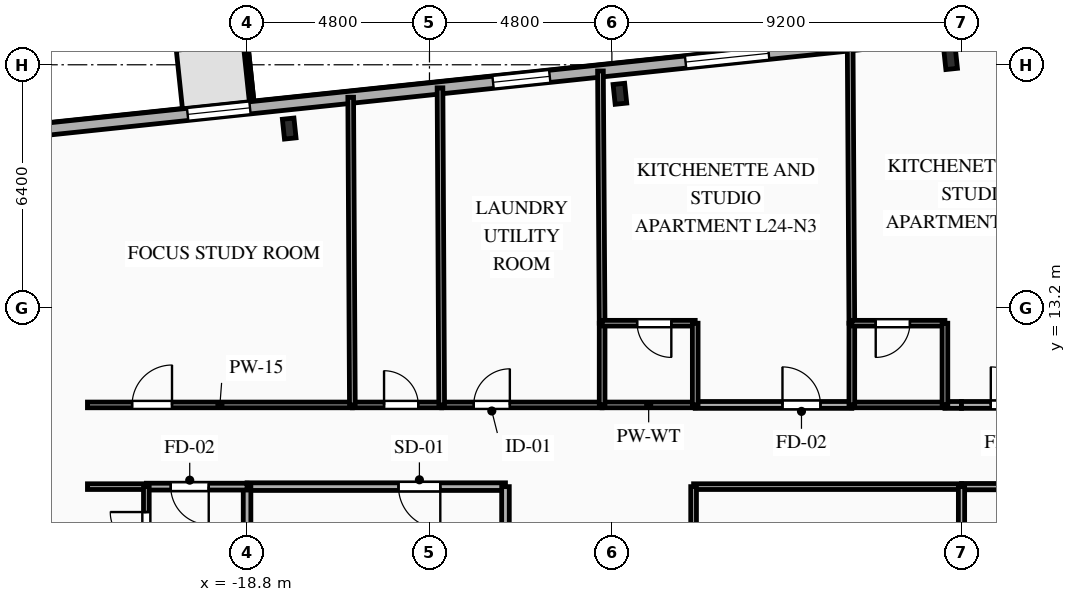
"""IFC4 building model, lengths in metres.
Left out: names, types, materials, properties, quantities, classifications, styles, units other than length and angle.
Written with IfcOpenShell. Run it as: python <this file> out.ifc"""

import sys

from ifc_helpers import new_model, si_unit, direction, frame, frame_2d, origin, origin_2d, place, context, subcontext, project, spatial, rectangle, i_section, extrude, element, fill, save


model = new_model("IFC4")
c1 = context("Model", 3, precision=1e-05, world=origin(), true_north=direction((0.0, 1.0)))
c2 = subcontext(c1, "Body", "Model", "MODEL_VIEW")
j1 = project(units=[si_unit("LENGTHUNIT", "METRE"), si_unit("PLANEANGLEUNIT", "RADIAN")], contexts=[c1])
p1 = place(None, origin())
s1 = spatial("IfcSite", under=j1, at=p1, CompositionType="ELEMENT")
p2 = place(p1, origin())
s2 = spatial("IfcBuilding", under=s1, at=p2, CompositionType="ELEMENT")
p3 = place(p2, frame((0.0, 0.0, 89.05)))
s3 = spatial("IfcBuildingStorey", under=s2, at=p3, CompositionType="ELEMENT", Elevation=89.05)
for number, where, z_axis, x_axis in (
    (1, (-0.287, 19.751, 0.0), (0.0, 0.0, 1.0), (0.995, 0.105, 0.0)),
    (2, (-8.989, 18.836, 0.0), (0.0, 0.0, 1.0), (0.995, 0.105, 0.0)),
    (3, (-17.691, 17.922, 0.0), (0.0, 0.0, 1.0), (0.995, 0.105, 0.0)),
):
    element("IfcColumn", number, at=place(p3, frame(where, z_axis=z_axis, x_axis=x_axis)), inside=s3, PredefinedType="COLUMN", context=c2, shape_type="SweptSolid", body=[
        extrude(i_section(OverallWidth=0.306, OverallDepth=0.524, WebThickness=0.021, FlangeThickness=0.04, FilletRadius=0.027, at=origin_2d()), origin(), (0.0, 0.0, 1.0), 3.35),
    ])
p4 = place(p3, frame((-27.107, 17.586, 0.0), z_axis=(0.0, 0.0, 1.0), x_axis=(0.994521628355, 0.104531003701, 0.0)))
e4 = element("IfcWall", 4, at=p4, inside=s3, PredefinedType="SOLIDWALL", context=c2, shape_type="SweptSolid", body=[
    extrude(rectangle(XDim=53.8, YDim=0.32, at=frame_2d((26.9, 0.0))), origin(), (0.0, 0.0, 1.0), 3.045),
])
p5 = place(p4, frame((6.781, 0.0, 0.85)))
e5 = element("IfcOpeningElement", 5, at=p5, cuts=e4, PredefinedType="OPENING", context=c2, shape_type="SweptSolid", body=[
    extrude(rectangle(XDim=1.65, YDim=1.85, at=frame_2d((0.825, 0.925))), frame((0.0, 0.17, 0.0), z_axis=(0.0, -1.0, 0.0), x_axis=(1.0, 0.0, 0.0)), (0.0, 0.0, 1.0), 0.34),
])
p6 = place(p4, frame((14.862, 0.0, 0.85)))
e6 = element("IfcOpeningElement", 6, at=p6, cuts=e4, PredefinedType="OPENING", context=c2, shape_type="SweptSolid", body=[
    extrude(rectangle(XDim=1.5, YDim=1.85, at=frame_2d((0.75, 0.925))), frame((0.0, 0.17, 0.0), z_axis=(0.0, -1.0, 0.0), x_axis=(1.0, 0.0, 0.0)), (0.0, 0.0, 1.0), 0.34),
])
p7 = place(p4, frame((19.956, 0.0, 0.85)))
e7 = element("IfcOpeningElement", 7, at=p7, cuts=e4, PredefinedType="OPENING", context=c2, shape_type="SweptSolid", body=[
    extrude(rectangle(XDim=2.2, YDim=1.85, at=frame_2d((1.1, 0.925))), frame((0.0, 0.17, 0.0), z_axis=(0.0, -1.0, 0.0), x_axis=(1.0, 0.0, 0.0)), (0.0, 0.0, 1.0), 0.34),
])
p8 = place(p4, frame((26.561, 0.0, 0.85)))
e8 = element("IfcOpeningElement", 8, at=p8, cuts=e4, PredefinedType="OPENING", context=c2, shape_type="SweptSolid", body=[
    extrude(rectangle(XDim=2.2, YDim=1.85, at=frame_2d((1.1, 0.925))), frame((0.0, 0.17, 0.0), z_axis=(0.0, -1.0, 0.0), x_axis=(1.0, 0.0, 0.0)), (0.0, 0.0, 1.0), 0.34),
])
p9 = place(p4, frame((33.166, 0.0, 0.85)))
e9 = element("IfcOpeningElement", 9, at=p9, cuts=e4, PredefinedType="OPENING", context=c2, shape_type="SweptSolid", body=[
    extrude(rectangle(XDim=2.2, YDim=1.85, at=frame_2d((1.1, 0.925))), frame((0.0, 0.17, 0.0), z_axis=(0.0, -1.0, 0.0), x_axis=(1.0, 0.0, 0.0)), (0.0, 0.0, 1.0), 0.34),
])
p10 = place(p4, frame((39.771, 0.0, 0.85)))
e10 = element("IfcOpeningElement", 10, at=p10, cuts=e4, PredefinedType="OPENING", context=c2, shape_type="SweptSolid", body=[
    extrude(rectangle(XDim=2.2, YDim=1.85, at=frame_2d((1.1, 0.925))), frame((0.0, 0.17, 0.0), z_axis=(0.0, -1.0, 0.0), x_axis=(1.0, 0.0, 0.0)), (0.0, 0.0, 1.0), 0.34),
])
p11 = place(p4, frame((46.45, 0.0, 0.85)))
e11 = element("IfcOpeningElement", 11, at=p11, cuts=e4, PredefinedType="OPENING", context=c2, shape_type="SweptSolid", body=[
    extrude(rectangle(XDim=1.65, YDim=1.85, at=frame_2d((0.825, 0.925))), frame((0.0, 0.17, 0.0), z_axis=(0.0, -1.0, 0.0), x_axis=(1.0, 0.0, 0.0)), (0.0, 0.0, 1.0), 0.34),
])
p12 = place(p3, frame((-12.0, 8.5, 0.0), z_axis=(0.0, 0.0, 1.0), x_axis=(-1.0, 0.0, 0.0)))
e12 = element("IfcWall", 12, at=p12, inside=s3, PredefinedType="PARTITIONING", context=c2, shape_type="SweptSolid", body=[
    extrude(rectangle(XDim=6.8, YDim=0.2, at=frame_2d((3.4, 0.0))), origin(), (0.0, 0.0, 1.0), 3.045),
])
p13 = place(p12, frame((1.715, 0.0, 0.0)))
e13 = element("IfcOpeningElement", 13, at=p13, cuts=e12, PredefinedType="OPENING", context=c2, shape_type="SweptSolid", body=[
    extrude(rectangle(XDim=1.1, YDim=2.15, at=frame_2d((0.55, 1.075))), frame((0.0, 0.11, 0.0), z_axis=(0.0, -1.0, 0.0), x_axis=(1.0, 0.0, 0.0)), (0.0, 0.0, 1.0), 0.22),
])
p14 = place(p3, frame((-12.0, 5.6, 0.0), z_axis=(0.0, 0.0, 1.0), x_axis=(0.0, 1.0, 0.0)))
e14 = element("IfcWall", 14, at=p14, inside=s3, PredefinedType="PARTITIONING", context=c2, shape_type="SweptSolid", body=[
    extrude(rectangle(XDim=2.9, YDim=0.2, at=frame_2d((1.45, 0.0))), origin(), (0.0, 0.0, 1.0), 3.045),
])
p15 = place(p3, frame((-18.8, 8.5, 0.0), z_axis=(0.0, 0.0, 1.0), x_axis=(0.0, -1.0, 0.0)))
e15 = element("IfcWall", 15, at=p15, inside=s3, PredefinedType="PARTITIONING", context=c2, shape_type="SweptSolid", body=[
    extrude(rectangle(XDim=2.9, YDim=0.2, at=frame_2d((1.45, 0.0))), origin(), (0.0, 0.0, 1.0), 2.53),
])
p16 = place(p3, frame((-18.8, 8.5, 0.0), z_axis=(0.0, 0.0, 1.0), x_axis=(-1.0, 0.0, 0.0)))
e16 = element("IfcWall", 16, at=p16, inside=s3, PredefinedType="PARTITIONING", context=c2, shape_type="SweptSolid", body=[
    extrude(rectangle(XDim=2.65, YDim=0.18, at=frame_2d((1.325, 0.0))), origin(), (0.0, 0.0, 1.0), 3.045),
])
p17 = place(p16, frame((1.009, 0.0, 0.0)))
e17 = element("IfcOpeningElement", 17, at=p17, cuts=e16, PredefinedType="OPENING", context=c2, shape_type="SweptSolid", body=[
    extrude(rectangle(XDim=1.0, YDim=2.15, at=frame_2d((0.5, 1.075))), frame((0.0, 0.1, 0.0), z_axis=(0.0, -1.0, 0.0), x_axis=(1.0, 0.0, 0.0)), (0.0, 0.0, 1.0), 0.2),
])
p18 = place(p3, frame((-21.45, 8.5, 0.0), z_axis=(0.0, 0.0, 1.0), x_axis=(-1.0, 0.0, 0.0)))
e18 = element("IfcWall", 18, at=p18, inside=s3, PredefinedType="PARTITIONING", context=c2, shape_type="SweptSolid", body=[
    extrude(rectangle(XDim=1.55, YDim=0.15, at=frame_2d((0.775, 0.0))), origin(), (0.0, 0.0, 1.0), 3.045),
])
p19 = place(p3, frame((-23.0, 10.65, 0.0), z_axis=(0.0, 0.0, 1.0), x_axis=(1.0, 0.0, 0.0)))
e19 = element("IfcWall", 19, at=p19, inside=s3, PredefinedType="PARTITIONING", context=c2, shape_type="SweptSolid", body=[
    extrude(rectangle(XDim=6.971, YDim=0.15, at=frame_2d((3.485, 0.0))), origin(), (0.0, 0.0, 1.0), 3.045),
])
p20 = place(p19, frame((1.175, 0.0, 0.0)))
e20 = element("IfcOpeningElement", 20, at=p20, cuts=e19, PredefinedType="OPENING", context=c2, shape_type="SweptSolid", body=[
    extrude(rectangle(XDim=1.05, YDim=2.15, at=frame_2d((0.525, 1.075))), frame((0.0, 0.085, 0.0), z_axis=(0.0, -1.0, 0.0), x_axis=(1.0, 0.0, 0.0)), (0.0, 0.0, 1.0), 0.17),
])
p21 = place(p3, frame((-16.029, 10.65, 0.0), z_axis=(0.0, 0.0, 1.0), x_axis=(1.0, 0.0, 0.0)))
e21 = element("IfcWall", 21, at=p21, inside=s3, PredefinedType="PLUMBINGWALL", context=c2, shape_type="SweptSolid", body=[
    extrude(rectangle(XDim=2.35, YDim=0.15, at=frame_2d((1.175, 0.0))), origin(), (0.0, 0.0, 1.0), 3.045),
])
p22 = place(p21, frame((0.834, 0.0, 0.0)))
e22 = element("IfcOpeningElement", 22, at=p22, cuts=e21, PredefinedType="OPENING", context=c2, shape_type="SweptSolid", body=[
    extrude(rectangle(XDim=0.9, YDim=2.1, at=frame_2d((0.45, 1.05))), frame((0.0, 0.085, 0.0), z_axis=(0.0, -1.0, 0.0), x_axis=(1.0, 0.0, 0.0)), (0.0, 0.0, 1.0), 0.17),
])
p23 = place(p3, frame((-13.679, 10.65, 0.0), z_axis=(0.0, 0.0, 1.0), x_axis=(1.0, 0.0, 0.0)))
e23 = element("IfcWall", 23, at=p23, inside=s3, PredefinedType="PARTITIONING", context=c2, shape_type="SweptSolid", body=[
    extrude(rectangle(XDim=4.222, YDim=0.15, at=frame_2d((2.111, 0.0))), origin(), (0.0, 0.0, 1.0), 3.045),
])
p24 = place(p23, frame((0.844, 0.0, 0.0)))
e24 = element("IfcOpeningElement", 24, at=p24, cuts=e23, PredefinedType="OPENING", context=c2, shape_type="SweptSolid", body=[
    extrude(rectangle(XDim=0.95, YDim=2.1, at=frame_2d((0.475, 1.05))), frame((0.0, 0.085, 0.0), z_axis=(0.0, -1.0, 0.0), x_axis=(1.0, 0.0, 0.0)), (0.0, 0.0, 1.0), 0.17),
])
p25 = place(p3, frame((-7.007, 10.65, 0.0), z_axis=(0.0, 0.0, 1.0), x_axis=(1.0, 0.0, 0.0)))
e25 = element("IfcWall", 25, at=p25, inside=s3, PredefinedType="PARTITIONING", context=c2, shape_type="SweptSolid", body=[
    extrude(rectangle(XDim=4.121, YDim=0.18, at=frame_2d((2.061, 0.0))), origin(), (0.0, 0.0, 1.0), 3.045),
])
p26 = place(p25, frame((2.296, 0.0, 0.0)))
e26 = element("IfcOpeningElement", 26, at=p26, cuts=e25, PredefinedType="OPENING", context=c2, shape_type="SweptSolid", body=[
    extrude(rectangle(XDim=1.0, YDim=2.15, at=frame_2d((0.5, 1.075))), frame((0.0, 0.1, 0.0), z_axis=(0.0, -1.0, 0.0), x_axis=(1.0, 0.0, 0.0)), (0.0, 0.0, 1.0), 0.2),
])
p27 = place(p3, frame((-9.457, 10.65, 0.0), z_axis=(0.0, 0.0, 1.0), x_axis=(1.0, 0.0, 0.0)))
e27 = element("IfcWall", 27, at=p27, inside=s3, PredefinedType="PLUMBINGWALL", context=c2, shape_type="SweptSolid", body=[
    extrude(rectangle(XDim=2.45, YDim=0.15, at=frame_2d((1.225, 0.0))), origin(), (0.0, 0.0, 1.0), 3.045),
])
p28 = place(p3, frame((-0.436, 10.65, 0.0), z_axis=(0.0, 0.0, 1.0), x_axis=(1.0, 0.0, 0.0)))
e28 = element("IfcWall", 28, at=p28, inside=s3, PredefinedType="PARTITIONING", context=c2, shape_type="SweptSolid", body=[
    extrude(rectangle(XDim=0.436, YDim=0.18, at=frame_2d((0.218, 0.0))), origin(), (0.0, 0.0, 1.0), 3.045),
])
p29 = place(p3, frame((-2.886, 10.65, 0.0), z_axis=(0.0, 0.0, 1.0), x_axis=(1.0, 0.0, 0.0)))
e29 = element("IfcWall", 29, at=p29, inside=s3, PredefinedType="PLUMBINGWALL", context=c2, shape_type="SweptSolid", body=[
    extrude(rectangle(XDim=2.45, YDim=0.15, at=frame_2d((1.225, 0.0))), origin(), (0.0, 0.0, 1.0), 3.045),
])
p30 = place(p3, frame((0.0, 8.5, 0.0), z_axis=(0.0, 0.0, 1.0), x_axis=(-1.0, 0.0, 0.0)))
e30 = element("IfcWall", 30, at=p30, inside=s3, PredefinedType="PARTITIONING", context=c2, shape_type="SweptSolid", body=[
    extrude(rectangle(XDim=7.05, YDim=0.15, at=frame_2d((3.525, 0.0))), origin(), (0.0, 0.0, 1.0), 3.045),
])
p31 = place(p3, frame((0.0, 10.65, 0.0), z_axis=(0.0, 0.0, 1.0), x_axis=(1.0, 0.0, 0.0)))
e31 = element("IfcWall", 31, at=p31, inside=s3, PredefinedType="PARTITIONING", context=c2, shape_type="SweptSolid", body=[
    extrude(rectangle(XDim=3.686, YDim=0.18, at=frame_2d((1.843, 0.0))), origin(), (0.0, 0.0, 1.0), 3.045),
])
p32 = place(p31, frame((0.771, 0.0, 0.0)))
e32 = element("IfcOpeningElement", 32, at=p32, cuts=e31, PredefinedType="OPENING", context=c2, shape_type="SweptSolid", body=[
    extrude(rectangle(XDim=1.0, YDim=2.15, at=frame_2d((0.5, 1.075))), frame((0.0, 0.1, 0.0), z_axis=(0.0, -1.0, 0.0), x_axis=(1.0, 0.0, 0.0)), (0.0, 0.0, 1.0), 0.2),
])
p33 = place(p3, frame((7.05, 8.5, 0.0), z_axis=(0.0, 0.0, 1.0), x_axis=(-1.0, 0.0, 0.0)))
e33 = element("IfcWall", 33, at=p33, inside=s3, PredefinedType="PARTITIONING", context=c2, shape_type="SweptSolid", body=[
    extrude(rectangle(XDim=7.05, YDim=0.165, at=frame_2d((3.525, 0.0))), origin(), (0.0, 0.0, 1.0), 3.045),
])
p34 = place(p33, frame((4.728, 0.0, 0.0)))
e34 = element("IfcOpeningElement", 34, at=p34, cuts=e33, PredefinedType="OPENING", context=c2, shape_type="SweptSolid", body=[
    extrude(rectangle(XDim=1.15, YDim=2.15, at=frame_2d((0.575, 1.075))), frame((0.0, 0.093, 0.0), z_axis=(0.0, -1.0, 0.0), x_axis=(1.0, 0.0, 0.0)), (0.0, 0.0, 1.0), 0.185),
])
p35 = place(p3, frame((-7.05, 8.5, 0.0), z_axis=(0.0, 0.0, 1.0), x_axis=(0.0, -1.0, 0.0)))
e35 = element("IfcWall", 35, at=p35, inside=s3, PredefinedType="PARTITIONING", context=c2, shape_type="SweptSolid", body=[
    extrude(rectangle(XDim=14.1, YDim=0.15, at=frame_2d((7.05, 0.0))), origin(), (0.0, 0.0, 1.0), 3.045),
])
p36 = place(p35, frame((8.011, 0.0, 0.0)))
e36 = element("IfcOpeningElement", 36, at=p36, cuts=e35, PredefinedType="OPENING", context=c2, shape_type="SweptSolid", body=[
    extrude(rectangle(XDim=1.05, YDim=2.15, at=frame_2d((0.525, 1.075))), frame((0.0, 0.085, 0.0), z_axis=(0.0, -1.0, 0.0), x_axis=(1.0, 0.0, 0.0)), (0.0, 0.0, 1.0), 0.17),
])
p37 = place(p3, frame((-21.45, 5.68, 0.0), z_axis=(0.0, 0.0, 1.0), x_axis=(0.0, 1.0, 0.0)))
e37 = element("IfcWall", 37, at=p37, inside=s3, PredefinedType="PARTITIONING", context=c2, shape_type="SweptSolid", body=[
    extrude(rectangle(XDim=2.82, YDim=0.15, at=frame_2d((1.41, 0.0))), origin(), (0.0, 0.0, 1.0), 3.045),
])
p38 = place(p37, frame((1.201, 0.0, 0.0)))
e38 = element("IfcOpeningElement", 38, at=p38, cuts=e37, PredefinedType="OPENING", context=c2, shape_type="SweptSolid", body=[
    extrude(rectangle(XDim=0.95, YDim=2.1, at=frame_2d((0.475, 1.05))), frame((0.0, 0.085, 0.0), z_axis=(0.0, -1.0, 0.0), x_axis=(1.0, 0.0, 0.0)), (0.0, 0.0, 1.0), 0.17),
])
p39 = place(p3, frame((-16.073, 18.746, 0.0), z_axis=(0.0, 0.0, 1.0), x_axis=(0.005428146808, -0.999985267503, 0.0)))
e39 = element("IfcWall", 39, at=p39, inside=s3, PredefinedType="PLUMBINGWALL", context=c2, shape_type="SweptSolid", body=[
    extrude(rectangle(XDim=8.096, YDim=0.15, at=frame_2d((4.048, 0.0))), origin(), (0.0, 0.0, 1.0), 3.045),
])
p40 = place(p3, frame((-13.723, 18.992, 0.0), z_axis=(0.0, 0.0, 1.0), x_axis=(0.005267551513, -0.999986126354, 0.0)))
e40 = element("IfcWall", 40, at=p40, inside=s3, PredefinedType="PLUMBINGWALL", context=c2, shape_type="SweptSolid", body=[
    extrude(rectangle(XDim=8.343, YDim=0.15, at=frame_2d((4.171, 0.0))), origin(), (0.0, 0.0, 1.0), 3.045),
])
p41 = place(p3, frame((-9.501, 19.436, 0.0), z_axis=(0.0, 0.0, 1.0), x_axis=(0.006621884097, -0.999978075085, 0.0)))
e41 = element("IfcWall", 41, at=p41, inside=s3, PredefinedType="PARTITIONING", context=c2, shape_type="SweptSolid", body=[
    extrude(rectangle(XDim=6.636, YDim=0.15, at=frame_2d((3.318, 0.0))), origin(), (0.0, 0.0, 1.0), 3.045),
])
p42 = place(p3, frame((-9.457, 12.8, 0.0), z_axis=(0.0, 0.0, 1.0), x_axis=(0.0, -1.0, 0.0)))
e42 = element("IfcWall", 42, at=p42, inside=s3, PredefinedType="PLUMBINGWALL", context=c2, shape_type="SweptSolid", body=[
    extrude(rectangle(XDim=2.15, YDim=0.15, at=frame_2d((1.075, 0.0))), origin(), (0.0, 0.0, 1.0), 3.045),
])
p43 = place(p3, frame((-7.007, 12.8, 0.0), z_axis=(0.0, 0.0, 1.0), x_axis=(-1.0, 0.0, 0.0)))
e43 = element("IfcWall", 43, at=p43, inside=s3, PredefinedType="PLUMBINGWALL", context=c2, shape_type="SweptSolid", body=[
    extrude(rectangle(XDim=2.45, YDim=0.15, at=frame_2d((1.225, 0.0))), origin(), (0.0, 0.0, 1.0), 3.045),
])
p44 = place(p43, frame((0.629, 0.0, 0.0)))
e44 = element("IfcOpeningElement", 44, at=p44, cuts=e43, PredefinedType="OPENING", context=c2, shape_type="SweptSolid", body=[
    extrude(rectangle(XDim=0.9, YDim=2.1, at=frame_2d((0.45, 1.05))), frame((0.0, 0.085, 0.0), z_axis=(0.0, -1.0, 0.0), x_axis=(1.0, 0.0, 0.0)), (0.0, 0.0, 1.0), 0.17),
])
p45 = place(p3, frame((-7.007, 10.65, 0.0), z_axis=(0.0, 0.0, 1.0), x_axis=(0.0, 1.0, 0.0)))
e45 = element("IfcWall", 45, at=p45, inside=s3, PredefinedType="PLUMBINGWALL", context=c2, shape_type="SweptSolid", body=[
    extrude(rectangle(XDim=2.15, YDim=0.15, at=frame_2d((1.075, 0.0))), origin(), (0.0, 0.0, 1.0), 3.045),
])
p46 = place(p3, frame((-2.93, 20.127, 0.0), z_axis=(0.0, 0.0, 1.0), x_axis=(0.005997692928, -0.999982013678, 0.0)))
e46 = element("IfcWall", 46, at=p46, inside=s3, PredefinedType="PARTITIONING", context=c2, shape_type="SweptSolid", body=[
    extrude(rectangle(XDim=7.327, YDim=0.15, at=frame_2d((3.664, 0.0))), origin(), (0.0, 0.0, 1.0), 3.045),
])
p47 = place(p3, frame((-2.886, 12.8, 0.0), z_axis=(0.0, 0.0, 1.0), x_axis=(0.0, -1.0, 0.0)))
e47 = element("IfcWall", 47, at=p47, inside=s3, PredefinedType="PLUMBINGWALL", context=c2, shape_type="SweptSolid", body=[
    extrude(rectangle(XDim=2.15, YDim=0.15, at=frame_2d((1.075, 0.0))), origin(), (0.0, 0.0, 1.0), 3.045),
])
p48 = place(p3, frame((-0.436, 12.8, 0.0), z_axis=(0.0, 0.0, 1.0), x_axis=(-1.0, 0.0, 0.0)))
e48 = element("IfcWall", 48, at=p48, inside=s3, PredefinedType="PLUMBINGWALL", context=c2, shape_type="SweptSolid", body=[
    extrude(rectangle(XDim=2.45, YDim=0.15, at=frame_2d((1.225, 0.0))), origin(), (0.0, 0.0, 1.0), 3.045),
])
p49 = place(p48, frame((0.921, 0.0, 0.0)))
e49 = element("IfcOpeningElement", 49, at=p49, cuts=e48, PredefinedType="OPENING", context=c2, shape_type="SweptSolid", body=[
    extrude(rectangle(XDim=0.9, YDim=2.1, at=frame_2d((0.45, 1.05))), frame((0.0, 0.085, 0.0), z_axis=(0.0, -1.0, 0.0), x_axis=(1.0, 0.0, 0.0)), (0.0, 0.0, 1.0), 0.17),
])
p50 = place(p3, frame((-0.436, 10.65, 0.0), z_axis=(0.0, 0.0, 1.0), x_axis=(0.0, 1.0, 0.0)))
e50 = element("IfcWall", 50, at=p50, inside=s3, PredefinedType="PLUMBINGWALL", context=c2, shape_type="SweptSolid", body=[
    extrude(rectangle(XDim=2.15, YDim=0.15, at=frame_2d((1.075, 0.0))), origin(), (0.0, 0.0, 1.0), 3.045),
])
p51 = place(p3, frame((0.0, 8.5, 0.0), z_axis=(0.0, 0.0, 1.0), x_axis=(0.0, -1.0, 0.0)))
e51 = element("IfcWall", 51, at=p51, inside=s3, PredefinedType="PARTITIONING", context=c2, shape_type="SweptSolid", body=[
    extrude(rectangle(XDim=7.05, YDim=0.165, at=frame_2d((3.525, 0.0))), origin(), (0.0, 0.0, 1.0), 3.045),
])
p52 = place(p5, origin())
e52 = element("IfcWindow", 52, at=p52, inside=s3, PartitioningType="SINGLE_PANEL", PredefinedType="WINDOW", context=c2, shape_type="SweptSolid", body=[
    extrude(rectangle(XDim=1.65, YDim=1.85, at=frame_2d((0.825, 0.925))), frame((0.0, 0.03, 0.0), z_axis=(0.0, -1.0, 0.0), x_axis=(1.0, 0.0, 0.0)), (0.0, 0.0, 1.0), 0.06),
])
fill(e5, e52)
p53 = place(p6, origin())
e53 = element("IfcWindow", 53, at=p53, inside=s3, PartitioningType="SINGLE_PANEL", PredefinedType="WINDOW", context=c2, shape_type="SweptSolid", body=[
    extrude(rectangle(XDim=1.5, YDim=1.85, at=frame_2d((0.75, 0.925))), frame((0.0, 0.03, 0.0), z_axis=(0.0, -1.0, 0.0), x_axis=(1.0, 0.0, 0.0)), (0.0, 0.0, 1.0), 0.06),
])
fill(e6, e53)
p54 = place(p7, origin())
e54 = element("IfcWindow", 54, at=p54, inside=s3, PartitioningType="SINGLE_PANEL", PredefinedType="WINDOW", context=c2, shape_type="SweptSolid", body=[
    extrude(rectangle(XDim=2.2, YDim=1.85, at=frame_2d((1.1, 0.925))), frame((0.0, 0.03, 0.0), z_axis=(0.0, -1.0, 0.0), x_axis=(1.0, 0.0, 0.0)), (0.0, 0.0, 1.0), 0.06),
])
fill(e7, e54)
p55 = place(p13, origin())
e55 = element("IfcDoor", 55, at=p55, inside=s3, OperationType="SINGLE_SWING_LEFT", PredefinedType="DOOR", context=c2, shape_type="SweptSolid", body=[
    extrude(rectangle(XDim=1.1, YDim=2.15, at=frame_2d((0.55, 1.075))), frame((0.0, 0.025, 0.0), z_axis=(0.0, -1.0, 0.0), x_axis=(1.0, 0.0, 0.0)), (0.0, 0.0, 1.0), 0.05),
])
fill(e13, e55)
p56 = place(p17, origin())
e56 = element("IfcDoor", 56, at=p56, inside=s3, OperationType="SINGLE_SWING_LEFT", PredefinedType="DOOR", context=c2, shape_type="SweptSolid", body=[
    extrude(rectangle(XDim=1.0, YDim=2.15, at=frame_2d((0.5, 1.075))), frame((0.0, 0.025, 0.0), z_axis=(0.0, -1.0, 0.0), x_axis=(1.0, 0.0, 0.0)), (0.0, 0.0, 1.0), 0.05),
])
fill(e17, e56)
p57 = place(p20, origin())
e57 = element("IfcDoor", 57, at=p57, inside=s3, OperationType="SINGLE_SWING_RIGHT", PredefinedType="DOOR", context=c2, shape_type="SweptSolid", body=[
    extrude(rectangle(XDim=1.05, YDim=2.15, at=frame_2d((0.525, 1.075))), frame((0.0, 0.025, 0.0), z_axis=(0.0, -1.0, 0.0), x_axis=(1.0, 0.0, 0.0)), (0.0, 0.0, 1.0), 0.05),
])
fill(e20, e57)
p58 = place(p22, origin())
e58 = element("IfcDoor", 58, at=p58, inside=s3, OperationType="SINGLE_SWING_LEFT", PredefinedType="DOOR", context=c2, shape_type="SweptSolid", body=[
    extrude(rectangle(XDim=0.9, YDim=2.1, at=frame_2d((0.45, 1.05))), frame((0.0, 0.025, 0.0), z_axis=(0.0, -1.0, 0.0), x_axis=(1.0, 0.0, 0.0)), (0.0, 0.0, 1.0), 0.05),
])
fill(e22, e58)
p59 = place(p24, origin())
e59 = element("IfcDoor", 59, at=p59, inside=s3, OperationType="SINGLE_SWING_RIGHT", PredefinedType="DOOR", context=c2, shape_type="SweptSolid", body=[
    extrude(rectangle(XDim=0.95, YDim=2.1, at=frame_2d((0.475, 1.05))), frame((0.0, 0.025, 0.0), z_axis=(0.0, -1.0, 0.0), x_axis=(1.0, 0.0, 0.0)), (0.0, 0.0, 1.0), 0.05),
])
fill(e24, e59)
p60 = place(p26, origin())
e60 = element("IfcDoor", 60, at=p60, inside=s3, OperationType="SINGLE_SWING_LEFT", PredefinedType="DOOR", context=c2, shape_type="SweptSolid", body=[
    extrude(rectangle(XDim=1.0, YDim=2.15, at=frame_2d((0.5, 1.075))), frame((0.0, 0.025, 0.0), z_axis=(0.0, -1.0, 0.0), x_axis=(1.0, 0.0, 0.0)), (0.0, 0.0, 1.0), 0.05),
])
fill(e26, e60)
p61 = place(p32, origin())
e61 = element("IfcDoor", 61, at=p61, inside=s3, OperationType="SINGLE_SWING_LEFT", PredefinedType="DOOR", context=c2, shape_type="SweptSolid", body=[
    extrude(rectangle(XDim=1.0, YDim=2.15, at=frame_2d((0.5, 1.075))), frame((0.0, 0.025, 0.0), z_axis=(0.0, -1.0, 0.0), x_axis=(1.0, 0.0, 0.0)), (0.0, 0.0, 1.0), 0.05),
])
fill(e32, e61)
p62 = place(p38, origin())
e62 = element("IfcDoor", 62, at=p62, inside=s3, OperationType="SINGLE_SWING_RIGHT", PredefinedType="DOOR", context=c2, shape_type="SweptSolid", body=[
    extrude(rectangle(XDim=0.95, YDim=2.1, at=frame_2d((0.475, 1.05))), frame((0.0, 0.025, 0.0), z_axis=(0.0, -1.0, 0.0), x_axis=(1.0, 0.0, 0.0)), (0.0, 0.0, 1.0), 0.05),
])
fill(e38, e62)
p63 = place(p44, origin())
e63 = element("IfcDoor", 63, at=p63, inside=s3, OperationType="SINGLE_SWING_LEFT", PredefinedType="DOOR", context=c2, shape_type="SweptSolid", body=[
    extrude(rectangle(XDim=0.9, YDim=2.1, at=frame_2d((0.45, 1.05))), frame((0.0, 0.025, 0.0), z_axis=(0.0, -1.0, 0.0), x_axis=(1.0, 0.0, 0.0)), (0.0, 0.0, 1.0), 0.05),
])
fill(e44, e63)
p64 = place(p49, origin())
e64 = element("IfcDoor", 64, at=p64, inside=s3, OperationType="SINGLE_SWING_RIGHT", PredefinedType="DOOR", context=c2, shape_type="SweptSolid", body=[
    extrude(rectangle(XDim=0.9, YDim=2.1, at=frame_2d((0.45, 1.05))), frame((0.0, 0.025, 0.0), z_axis=(0.0, -1.0, 0.0), x_axis=(1.0, 0.0, 0.0)), (0.0, 0.0, 1.0), 0.05),
])
fill(e49, e64)
save(model, sys.argv[1])
